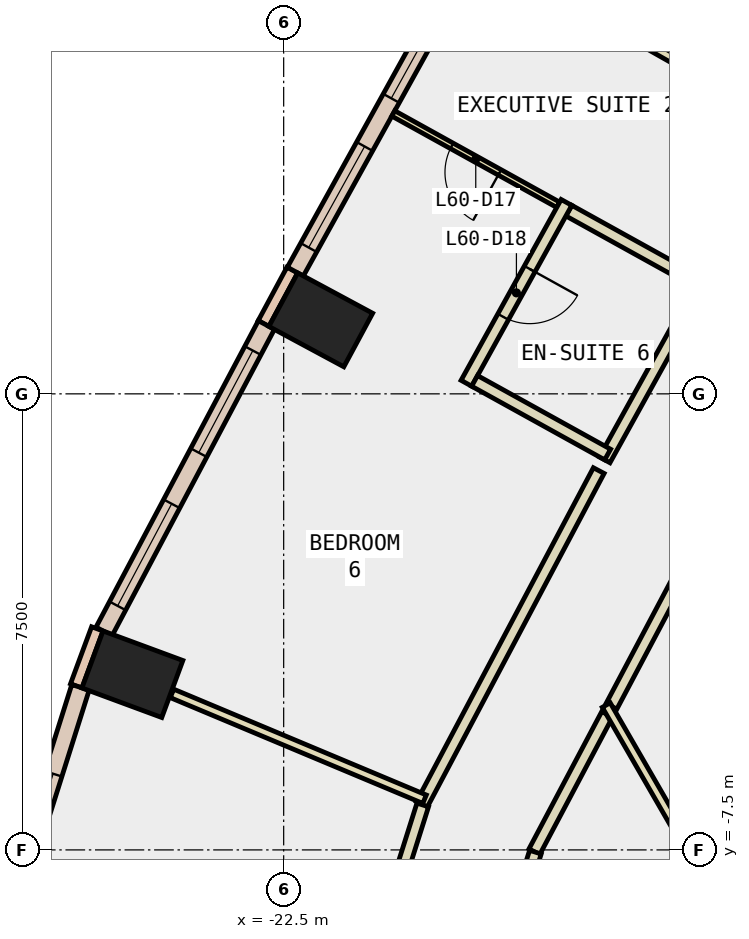
"""IFC4 building model, lengths in metres.
Left out: names, types, materials, properties, quantities, classifications, styles, units other than length and angle.
Written with IfcOpenShell. Run it as: python <this file> out.ifc"""

import sys

from ifc_helpers import new_model, si_unit, direction, frame, frame_2d, origin, origin_2d, place, context, subcontext, project, spatial, rectangle, extrude, element, fill, save


model = new_model("IFC4")
c1 = context("Model", 3, precision=1e-05, world=origin(), true_north=direction((0.0, 1.0)))
c2 = subcontext(c1, "Body", "Model", "MODEL_VIEW")
j1 = project(units=[si_unit("LENGTHUNIT", "METRE"), si_unit("PLANEANGLEUNIT", "RADIAN")], contexts=[c1])
p1 = place(None, origin())
s1 = spatial("IfcSite", under=j1, at=p1, CompositionType="ELEMENT")
p2 = place(p1, origin())
s2 = spatial("IfcBuilding", under=s1, at=p2, CompositionType="ELEMENT")
p3 = place(p2, frame((0.0, 0.0, 263.0)))
s3 = spatial("IfcBuildingStorey", under=s2, at=p3, CompositionType="ELEMENT", Elevation=263.0)
for number, where, z_axis, x_axis in (
    (1, (-21.89, 1.217, -0.34), (0.0, 0.0, 1.0), (0.474, 0.881, 0.0)),
    (2, (-24.988, -4.611, -0.34), (0.0, 0.0, 1.0), (0.347, 0.938, 0.0)),
):
    element("IfcColumn", number, at=place(p3, frame(where, z_axis=z_axis, x_axis=x_axis)), inside=s3, PredefinedType="COLUMN", context=c2, shape_type="SweptSolid", body=[
        extrude(rectangle(XDim=1.0, YDim=1.4, at=origin_2d()), origin(), (0.0, 0.0, 1.0), 3.6),
    ])
p4 = place(p3, frame((-22.357, 2.037, 0.0), z_axis=(0.0, 0.0, 1.0), x_axis=(-0.473852444207, -0.880604259085, 0.0)))
e3 = element("IfcWall", 3, at=p4, inside=s3, PredefinedType="STANDARD", context=c2, shape_type="SweptSolid", body=[
    extrude(rectangle(XDim=1.0, YDim=0.2, at=frame_2d((0.5, 0.0))), origin(), (0.0, 0.0, 1.0), 3.26),
])
p5 = place(p3, frame((-25.565, -3.865, 0.0), z_axis=(0.0, 0.0, 1.0), x_axis=(-0.347107644204, -0.937825294677, 0.0)))
e4 = element("IfcWall", 4, at=p5, inside=s3, PredefinedType="STANDARD", context=c2, shape_type="SweptSolid", body=[
    extrude(rectangle(XDim=1.0, YDim=0.2, at=frame_2d((0.5, 0.0))), origin(), (0.0, 0.0, 1.0), 3.26),
])
p6 = place(p3, frame((-19.591, 6.919, 0.0), z_axis=(0.0, 0.0, 1.0), x_axis=(-0.484260568952, -0.874923826032, 0.0)))
e5 = element("IfcWall", 5, at=p6, inside=s3, PredefinedType="STANDARD", context=c2, shape_type="SweptSolid", body=[
    extrude(rectangle(XDim=5.611, YDim=0.3, at=frame_2d((2.805, 0.0))), origin(), (0.0, 0.0, 1.0), 3.26),
])
p7 = place(p6, frame((0.453, 0.0, 0.9)))
e6 = element("IfcOpeningElement", 6, at=p7, cuts=e5, PredefinedType="OPENING", context=c2, shape_type="SweptSolid", body=[
    extrude(rectangle(XDim=1.9, YDim=2.0, at=frame_2d((0.95, 1.0))), frame((0.0, 0.16, 0.0), z_axis=(0.0, -1.0, 0.0), x_axis=(1.0, 0.0, 0.0)), (0.0, 0.0, 1.0), 0.32),
])
p8 = place(p6, frame((3.258, 0.0, 0.9)))
e7 = element("IfcOpeningElement", 7, at=p8, cuts=e5, PredefinedType="OPENING", context=c2, shape_type="SweptSolid", body=[
    extrude(rectangle(XDim=1.9, YDim=2.0, at=frame_2d((0.95, 1.0))), frame((0.0, 0.16, 0.0), z_axis=(0.0, -1.0, 0.0), x_axis=(1.0, 0.0, 0.0)), (0.0, 0.0, 1.0), 0.32),
])
p9 = place(p3, frame((-22.784, 1.132, 0.0), z_axis=(0.0, 0.0, 1.0), x_axis=(-0.468220106253, -0.883611867338, 0.0)))
e8 = element("IfcWall", 8, at=p9, inside=s3, PredefinedType="STANDARD", context=c2, shape_type="SweptSolid", body=[
    extrude(rectangle(XDim=5.703, YDim=0.3, at=frame_2d((2.852, 0.0))), origin(), (0.0, 0.0, 1.0), 3.26),
])
p10 = place(p9, frame((0.476, 0.0, 0.9)))
e9 = element("IfcOpeningElement", 9, at=p10, cuts=e8, PredefinedType="OPENING", context=c2, shape_type="SweptSolid", body=[
    extrude(rectangle(XDim=1.9, YDim=2.0, at=frame_2d((0.95, 1.0))), frame((0.0, 0.16, 0.0), z_axis=(0.0, -1.0, 0.0), x_axis=(1.0, 0.0, 0.0)), (0.0, 0.0, 1.0), 0.32),
])
p11 = place(p9, frame((3.327, 0.0, 0.9)))
e10 = element("IfcOpeningElement", 10, at=p11, cuts=e8, PredefinedType="OPENING", context=c2, shape_type="SweptSolid", body=[
    extrude(rectangle(XDim=1.9, YDim=2.0, at=frame_2d((0.95, 1.0))), frame((0.0, 0.16, 0.0), z_axis=(0.0, -1.0, 0.0), x_axis=(1.0, 0.0, 0.0)), (0.0, 0.0, 1.0), 0.32),
])
p12 = place(p3, frame((-25.842, -4.827, 0.0), z_axis=(0.0, 0.0, 1.0), x_axis=(-0.30108868778, -0.953596142028, 0.0)))
e11 = element("IfcWall", 11, at=p12, inside=s3, PredefinedType="STANDARD", context=c2, shape_type="SweptSolid", body=[
    extrude(rectangle(XDim=4.38, YDim=0.3, at=frame_2d((2.19, 0.0))), origin(), (0.0, 0.0, 1.0), 3.26),
])
p13 = place(p12, frame((1.49, 0.0, 0.9)))
e12 = element("IfcOpeningElement", 12, at=p13, cuts=e11, PredefinedType="OPENING", context=c2, shape_type="SweptSolid", body=[
    extrude(rectangle(XDim=1.4, YDim=2.0, at=frame_2d((0.7, 1.0))), frame((0.0, 0.16, 0.0), z_axis=(0.0, -1.0, 0.0), x_axis=(1.0, 0.0, 0.0)), (0.0, 0.0, 1.0), 0.32),
])
p14 = place(p3, frame((-15.56, -2.214, 0.0), z_axis=(0.0, 0.0, 1.0), x_axis=(-0.468104679961, -0.883673021314, 0.0)))
e13 = element("IfcWall", 13, at=p14, inside=s3, PredefinedType="PARTITIONING", context=c2, shape_type="SweptSolid", body=[
    extrude(rectangle(XDim=3.309, YDim=0.2, at=frame_2d((1.654, 0.0))), origin(), (0.0, 0.0, 1.0), 3.26),
])
p15 = place(p3, frame((-17.18, -5.271, 0.0), z_axis=(0.0, 0.0, 1.0), x_axis=(-0.468212372113, -0.883615965564, 0.0)))
e14 = element("IfcWall", 14, at=p15, inside=s3, PredefinedType="PARTITIONING", context=c2, shape_type="SweptSolid", body=[
    extrude(rectangle(XDim=2.557, YDim=0.2, at=frame_2d((1.278, 0.0))), origin(), (0.0, 0.0, 1.0), 3.26),
])
p16 = place(p3, frame((-18.36, -7.537, 0.0), z_axis=(0.0, 0.0, 1.0), x_axis=(-0.301325410186, -0.953521366922, 0.0)))
e15 = element("IfcWall", 15, at=p16, inside=s3, PredefinedType="PARTITIONING", context=c2, shape_type="SweptSolid", body=[
    extrude(rectangle(XDim=2.469, YDim=0.2, at=frame_2d((1.234, 0.0))), origin(), (0.0, 0.0, 1.0), 3.26),
])
p17 = place(p3, frame((-20.229, -6.754, 0.0), z_axis=(0.0, 0.0, 1.0), x_axis=(0.468313568794, 0.883562335822, 0.0)))
e16 = element("IfcWall", 16, at=p17, inside=s3, PredefinedType="PARTITIONING", context=c2, shape_type="SweptSolid", body=[
    extrude(rectangle(XDim=6.216, YDim=0.2, at=frame_2d((3.108, 0.0))), origin(), (0.0, 0.0, 1.0), 3.26),
])
p18 = place(p3, frame((-17.221, -1.085, 0.0), z_axis=(0.0, 0.0, 1.0), x_axis=(0.48445041864, 0.874818719438, 0.0)))
e17 = element("IfcWall", 17, at=p18, inside=s3, PredefinedType="PARTITIONING", context=c2, shape_type="SweptSolid", body=[
    extrude(rectangle(XDim=3.2, YDim=0.2, at=frame_2d((1.6, 0.0))), origin(), (0.0, 0.0, 1.0), 3.26),
])
p19 = place(p3, frame((-21.18, -9.821, 0.0), z_axis=(0.0, 0.0, 1.0), x_axis=(0.301331608119, 0.953519408271, 0.0)))
e18 = element("IfcWall", 18, at=p19, inside=s3, PredefinedType="PARTITIONING", context=c2, shape_type="SweptSolid", body=[
    extrude(rectangle(XDim=3.209, YDim=0.2, at=frame_2d((1.604, 0.0))), origin(), (0.0, 0.0, 1.0), 3.26),
])
p20 = place(p3, frame((-15.427, -8.18, 0.0), z_axis=(0.0, 0.0, 1.0), x_axis=(-0.500045204515, 0.865999303373, 0.0)))
e19 = element("IfcWall", 19, at=p20, inside=s3, PredefinedType="PARTITIONING", context=c2, shape_type="SweptSolid", body=[
    extrude(rectangle(XDim=3.536, YDim=0.15, at=frame_2d((1.768, 0.0))), origin(), (0.0, 0.0, 1.0), 3.26),
])
p21 = place(p3, frame((-14.083, 4.377, 0.0), z_axis=(0.0, 0.0, 1.0), x_axis=(-0.870415885751, 0.492317159799, 0.0)))
e20 = element("IfcWall", 20, at=p21, inside=s3, PredefinedType="PARTITIONING", context=c2, shape_type="SweptSolid", body=[
    extrude(rectangle(XDim=4.581, YDim=0.15, at=frame_2d((2.29, 0.0))), origin(), (0.0, 0.0, 1.0), 3.26),
])
p22 = place(p3, frame((-17.985, 3.109, 0.0), z_axis=(0.0, 0.0, 1.0), x_axis=(-0.874762085098, 0.484552674614, 0.0)))
e21 = element("IfcWall", 21, at=p22, inside=s3, PredefinedType="PARTITIONING", context=c2, shape_type="SweptSolid", body=[
    extrude(rectangle(XDim=3.1, YDim=0.1, at=frame_2d((1.55, 0.0))), origin(), (0.0, 0.0, 1.0), 3.26),
])
p23 = place(p22, frame((1.1, 0.0, 0.0)))
e22 = element("IfcOpeningElement", 22, at=p23, cuts=e21, PredefinedType="OPENING", context=c2, shape_type="SweptSolid", body=[
    extrude(rectangle(XDim=0.9, YDim=2.1, at=frame_2d((0.45, 1.05))), frame((0.0, 0.06, 0.0), z_axis=(0.0, -1.0, 0.0), x_axis=(1.0, 0.0, 0.0)), (0.0, 0.0, 1.0), 0.12),
])
p24 = place(p3, frame((-15.71, 1.85, 0.0), z_axis=(0.0, 0.0, 1.0), x_axis=(-0.874842414173, 0.484407628308, 0.0)))
e23 = element("IfcWall", 23, at=p24, inside=s3, PredefinedType="PARTITIONING", context=c2, shape_type="SweptSolid", body=[
    extrude(rectangle(XDim=2.401, YDim=0.2, at=frame_2d((1.2, 0.0))), origin(), (0.0, 0.0, 1.0), 3.26),
])
p25 = place(p3, frame((-17.849, 3.148, 0.0), z_axis=(0.0, 0.0, 1.0), x_axis=(-0.484257957482, -0.874925271446, 0.0)))
e24 = element("IfcWall", 24, at=p25, inside=s3, PredefinedType="PARTITIONING", context=c2, shape_type="SweptSolid", body=[
    extrude(rectangle(XDim=3.399, YDim=0.2, at=frame_2d((1.699, 0.0))), origin(), (0.0, 0.0, 1.0), 3.26),
])
p26 = place(p25, frame((1.25, 0.0, 0.0)))
e25 = element("IfcOpeningElement", 25, at=p26, cuts=e24, PredefinedType="OPENING", context=c2, shape_type="SweptSolid", body=[
    extrude(rectangle(XDim=0.9, YDim=2.1, at=frame_2d((0.45, 1.05))), frame((0.0, 0.11, 0.0), z_axis=(0.0, -1.0, 0.0), x_axis=(1.0, 0.0, 0.0)), (0.0, 0.0, 1.0), 0.22),
])
p27 = place(p3, frame((-19.36, 0.213, 0.0), z_axis=(0.0, 0.0, 1.0), x_axis=(0.874939003568, -0.484233146362, 0.0)))
e26 = element("IfcWall", 26, at=p27, inside=s3, PredefinedType="PARTITIONING", context=c2, shape_type="SweptSolid", body=[
    extrude(rectangle(XDim=2.501, YDim=0.2, at=frame_2d((1.25, 0.0))), origin(), (0.0, 0.0, 1.0), 3.26),
])
p28 = place(p3, frame((-20.183, -6.666, 0.0), z_axis=(0.0, 0.0, 1.0), x_axis=(-0.922347108299, 0.386362280525, 0.0)))
e27 = element("IfcWall", 27, at=p28, inside=s3, PredefinedType="PARTITIONING", context=c2, shape_type="SweptSolid", body=[
    extrude(rectangle(XDim=4.503, YDim=0.15, at=frame_2d((2.252, 0.0))), origin(), (0.0, 0.0, 1.0), 3.26),
])
p29 = place(p7, origin())
e28 = element("IfcWindow", 28, at=p29, inside=s3, PartitioningType="SINGLE_PANEL", PredefinedType="WINDOW", context=c2, shape_type="SweptSolid", body=[
    extrude(rectangle(XDim=1.9, YDim=2.0, at=frame_2d((0.95, 1.0))), frame((0.0, 0.03, 0.0), z_axis=(0.0, -1.0, 0.0), x_axis=(1.0, 0.0, 0.0)), (0.0, 0.0, 1.0), 0.06),
])
fill(e6, e28)
p30 = place(p8, origin())
e29 = element("IfcWindow", 29, at=p30, inside=s3, PartitioningType="SINGLE_PANEL", PredefinedType="WINDOW", context=c2, shape_type="SweptSolid", body=[
    extrude(rectangle(XDim=1.9, YDim=2.0, at=frame_2d((0.95, 1.0))), frame((0.0, 0.03, 0.0), z_axis=(0.0, -1.0, 0.0), x_axis=(1.0, 0.0, 0.0)), (0.0, 0.0, 1.0), 0.06),
])
fill(e7, e29)
p31 = place(p10, origin())
e30 = element("IfcWindow", 30, at=p31, inside=s3, PartitioningType="SINGLE_PANEL", PredefinedType="WINDOW", context=c2, shape_type="SweptSolid", body=[
    extrude(rectangle(XDim=1.9, YDim=2.0, at=frame_2d((0.95, 1.0))), frame((0.0, 0.03, 0.0), z_axis=(0.0, -1.0, 0.0), x_axis=(1.0, 0.0, 0.0)), (0.0, 0.0, 1.0), 0.06),
])
fill(e9, e30)
p32 = place(p11, origin())
e31 = element("IfcWindow", 31, at=p32, inside=s3, PartitioningType="SINGLE_PANEL", PredefinedType="WINDOW", context=c2, shape_type="SweptSolid", body=[
    extrude(rectangle(XDim=1.9, YDim=2.0, at=frame_2d((0.95, 1.0))), frame((0.0, 0.03, 0.0), z_axis=(0.0, -1.0, 0.0), x_axis=(1.0, 0.0, 0.0)), (0.0, 0.0, 1.0), 0.06),
])
fill(e10, e31)
p33 = place(p13, origin())
e32 = element("IfcWindow", 32, at=p33, inside=s3, PartitioningType="SINGLE_PANEL", PredefinedType="WINDOW", context=c2, shape_type="SweptSolid", body=[
    extrude(rectangle(XDim=1.4, YDim=2.0, at=frame_2d((0.7, 1.0))), frame((0.0, 0.03, 0.0), z_axis=(0.0, -1.0, 0.0), x_axis=(1.0, 0.0, 0.0)), (0.0, 0.0, 1.0), 0.06),
])
fill(e12, e32)
p34 = place(p23, origin())
e33 = element("IfcDoor", 33, at=p34, inside=s3, OperationType="SINGLE_SWING_LEFT", PredefinedType="DOOR", context=c2, shape_type="SweptSolid", body=[
    extrude(rectangle(XDim=0.9, YDim=2.1, at=frame_2d((0.45, 1.05))), frame((0.0, 0.025, 0.0), z_axis=(0.0, -1.0, 0.0), x_axis=(1.0, 0.0, 0.0)), (0.0, 0.0, 1.0), 0.05),
])
fill(e22, e33)
p35 = place(p26, origin())
e34 = element("IfcDoor", 34, at=p35, inside=s3, OperationType="SINGLE_SWING_LEFT", PredefinedType="DOOR", context=c2, shape_type="SweptSolid", body=[
    extrude(rectangle(XDim=0.9, YDim=2.1, at=frame_2d((0.45, 1.05))), frame((0.0, 0.025, 0.0), z_axis=(0.0, -1.0, 0.0), x_axis=(1.0, 0.0, 0.0)), (0.0, 0.0, 1.0), 0.05),
])
fill(e25, e34)
save(model, sys.argv[1])
